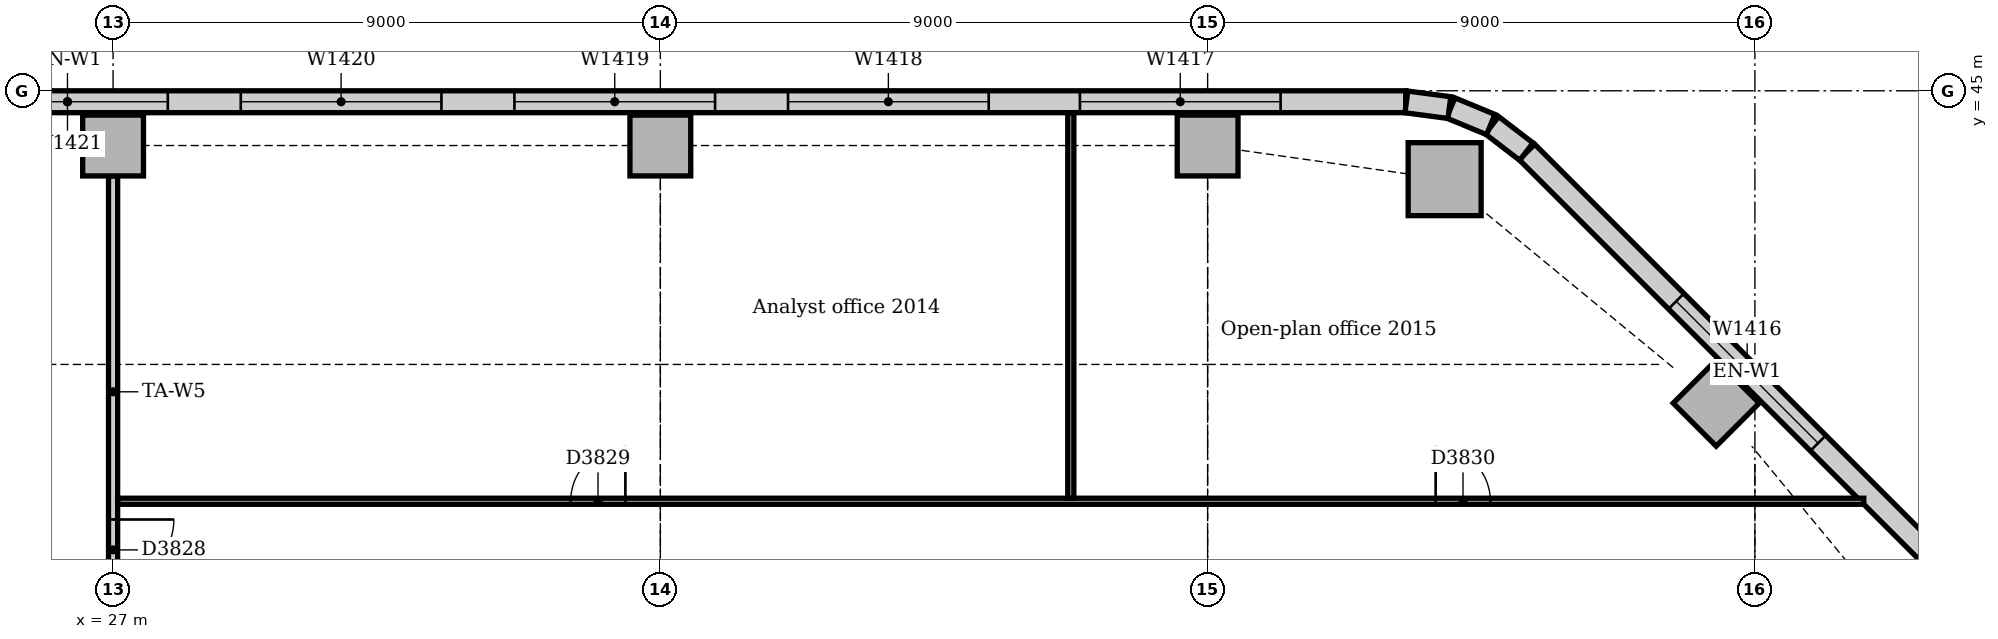
"""IFC4 building model, lengths in metres.
Left out: names, types, materials, properties, quantities, classifications, styles, units other than length and angle.
Written with IfcOpenShell. Run it as: python <this file> out.ifc"""

import sys

from ifc_helpers import new_model, si_unit, direction, frame, frame_2d, origin, origin_2d, place, context, subcontext, project, spatial, rectangle, extrude, element, fill, save


model = new_model("IFC4")
c1 = context("Model", 3, precision=1e-05, world=origin(), true_north=direction((0.0, 1.0)))
c2 = subcontext(c1, "Body", "Model", "MODEL_VIEW")
j1 = project(units=[si_unit("LENGTHUNIT", "METRE"), si_unit("PLANEANGLEUNIT", "RADIAN")], contexts=[c1])
p1 = place(None, origin())
s1 = spatial("IfcSite", under=j1, at=p1, CompositionType="ELEMENT")
p2 = place(p1, origin())
s2 = spatial("IfcBuilding", under=s1, at=p2, CompositionType="ELEMENT")
p3 = place(p2, frame((0.0, 0.0, 87.0)))
s3 = spatial("IfcBuildingStorey", under=s2, at=p3, CompositionType="ELEMENT", Elevation=87.0)
p4 = place(p3, frame((48.898, 43.547, 0.0), z_axis=(0.0, 0.0, 1.0), x_axis=(1.0, 0.0, 0.0)))
e1 = element("IfcColumn", 1, at=p4, inside=s3, PredefinedType="COLUMN", context=c2, shape_type="SweptSolid", body=[
    extrude(rectangle(XDim=1.2, YDim=1.2, at=origin_2d()), origin(), (0.0, 0.0, 1.0), 3.85),
])
for number, where, z_axis, x_axis in (
    (2, (53.364, 39.864, 0.0), (0.0, 0.0, 1.0), (0.707, 0.707, 0.0)),
    (3, (27.0, 44.1, 0.0), (0.0, 0.0, 1.0), (1.0, 0.0, 0.0)),
    (4, (36.0, 44.1, 0.0), (0.0, 0.0, 1.0), (1.0, 0.0, 0.0)),
    (5, (45.0, 44.1, 0.0), (0.0, 0.0, 1.0), (1.0, 0.0, 0.0)),
):
    element("IfcColumn", number, at=place(p3, frame(where, z_axis=z_axis, x_axis=x_axis)), inside=s3, PredefinedType="COLUMN", context=c2, shape_type="SweptSolid", body=[
        extrude(rectangle(XDim=1.0, YDim=1.0, at=origin_2d()), origin(), (0.0, 0.0, 1.0), 3.85),
    ])
p5 = place(p3, frame((57.494, 36.751, 0.0), z_axis=(0.0, 0.0, 1.0), x_axis=(-0.707106781187, 0.707106781187, 0.0)))
e6 = element("IfcWall", 6, at=p5, inside=s3, PredefinedType="STANDARD", context=c2, shape_type="SweptSolid", body=[
    extrude(rectangle(XDim=10.243, YDim=0.36, at=frame_2d((5.121, 0.0))), origin(), (0.0, 0.0, 1.0), 3.85),
])
p6 = place(p5, frame((3.471, 0.0, 0.9)))
e7 = element("IfcOpeningElement", 7, at=p6, cuts=e6, PredefinedType="OPENING", context=c2, shape_type="SweptSolid", body=[
    extrude(rectangle(XDim=3.3, YDim=1.6, at=frame_2d((1.65, 0.8))), frame((0.0, 0.19, 0.0), z_axis=(0.0, -1.0, 0.0), x_axis=(1.0, 0.0, 0.0)), (0.0, 0.0, 1.0), 0.38),
])
p7 = place(p3, frame((48.257, 44.82, 0.0), z_axis=(0.0, 0.0, 1.0), x_axis=(-1.0, 0.0, 0.0)))
e8 = element("IfcWall", 8, at=p7, inside=s3, PredefinedType="STANDARD", context=c2, shape_type="SweptSolid", body=[
    extrude(rectangle(XDim=44.015, YDim=0.36, at=frame_2d((22.007, 0.0))), origin(), (0.0, 0.0, 1.0), 3.85),
])
p8 = place(p7, frame((2.057, 0.0, 0.9)))
e9 = element("IfcOpeningElement", 9, at=p8, cuts=e8, PredefinedType="OPENING", context=c2, shape_type="SweptSolid", body=[
    extrude(rectangle(XDim=3.3, YDim=1.6, at=frame_2d((1.65, 0.8))), frame((0.0, 0.19, 0.0), z_axis=(0.0, -1.0, 0.0), x_axis=(1.0, 0.0, 0.0)), (0.0, 0.0, 1.0), 0.38),
])
p9 = place(p7, frame((6.857, 0.0, 0.9)))
e10 = element("IfcOpeningElement", 10, at=p9, cuts=e8, PredefinedType="OPENING", context=c2, shape_type="SweptSolid", body=[
    extrude(rectangle(XDim=3.3, YDim=1.6, at=frame_2d((1.65, 0.8))), frame((0.0, 0.19, 0.0), z_axis=(0.0, -1.0, 0.0), x_axis=(1.0, 0.0, 0.0)), (0.0, 0.0, 1.0), 0.38),
])
p10 = place(p7, frame((11.357, 0.0, 0.9)))
e11 = element("IfcOpeningElement", 11, at=p10, cuts=e8, PredefinedType="OPENING", context=c2, shape_type="SweptSolid", body=[
    extrude(rectangle(XDim=3.3, YDim=1.6, at=frame_2d((1.65, 0.8))), frame((0.0, 0.19, 0.0), z_axis=(0.0, -1.0, 0.0), x_axis=(1.0, 0.0, 0.0)), (0.0, 0.0, 1.0), 0.38),
])
p11 = place(p7, frame((15.857, 0.0, 0.9)))
e12 = element("IfcOpeningElement", 12, at=p11, cuts=e8, PredefinedType="OPENING", context=c2, shape_type="SweptSolid", body=[
    extrude(rectangle(XDim=3.3, YDim=1.6, at=frame_2d((1.65, 0.8))), frame((0.0, 0.19, 0.0), z_axis=(0.0, -1.0, 0.0), x_axis=(1.0, 0.0, 0.0)), (0.0, 0.0, 1.0), 0.38),
])
p12 = place(p7, frame((20.357, 0.0, 0.9)))
e13 = element("IfcOpeningElement", 13, at=p12, cuts=e8, PredefinedType="OPENING", context=c2, shape_type="SweptSolid", body=[
    extrude(rectangle(XDim=3.3, YDim=1.6, at=frame_2d((1.65, 0.8))), frame((0.0, 0.19, 0.0), z_axis=(0.0, -1.0, 0.0), x_axis=(1.0, 0.0, 0.0)), (0.0, 0.0, 1.0), 0.38),
])
p13 = place(p7, frame((25.957, 0.0, 0.9)))
e14 = element("IfcOpeningElement", 14, at=p13, cuts=e8, PredefinedType="OPENING", context=c2, shape_type="SweptSolid", body=[
    extrude(rectangle(XDim=1.8, YDim=1.6, at=frame_2d((0.9, 0.8))), frame((0.0, 0.19, 0.0), z_axis=(0.0, -1.0, 0.0), x_axis=(1.0, 0.0, 0.0)), (0.0, 0.0, 1.0), 0.38),
])
p14 = place(p7, frame((29.357, 0.0, 0.9)))
e15 = element("IfcOpeningElement", 15, at=p14, cuts=e8, PredefinedType="OPENING", context=c2, shape_type="SweptSolid", body=[
    extrude(rectangle(XDim=3.3, YDim=1.6, at=frame_2d((1.65, 0.8))), frame((0.0, 0.19, 0.0), z_axis=(0.0, -1.0, 0.0), x_axis=(1.0, 0.0, 0.0)), (0.0, 0.0, 1.0), 0.38),
])
p15 = place(p7, frame((33.857, 0.0, 0.9)))
e16 = element("IfcOpeningElement", 16, at=p15, cuts=e8, PredefinedType="OPENING", context=c2, shape_type="SweptSolid", body=[
    extrude(rectangle(XDim=3.3, YDim=1.6, at=frame_2d((1.65, 0.8))), frame((0.0, 0.19, 0.0), z_axis=(0.0, -1.0, 0.0), x_axis=(1.0, 0.0, 0.0)), (0.0, 0.0, 1.0), 0.38),
])
p16 = place(p7, frame((38.357, 0.0, 0.9)))
e17 = element("IfcOpeningElement", 17, at=p16, cuts=e8, PredefinedType="OPENING", context=c2, shape_type="SweptSolid", body=[
    extrude(rectangle(XDim=3.3, YDim=1.6, at=frame_2d((1.65, 0.8))), frame((0.0, 0.19, 0.0), z_axis=(0.0, -1.0, 0.0), x_axis=(1.0, 0.0, 0.0)), (0.0, 0.0, 1.0), 0.38),
])
p17 = place(p3, frame((50.241, 44.0, 0.0), z_axis=(0.0, 0.0, 1.0), x_axis=(-0.793321924995, 0.608802368033, 0.0)))
e18 = element("IfcWall", 18, at=p17, inside=s3, PredefinedType="STANDARD", context=c2, shape_type="SweptSolid", body=[
    extrude(rectangle(XDim=0.713, YDim=0.36, at=frame_2d((0.357, 0.0))), origin(), (0.0, 0.0, 1.0), 3.85),
])
for number, where, z_axis, x_axis in (
    (19, (49.656, 44.445, 0.0), (0.0, 0.0, 1.0), (-0.924, 0.383, 0.0)),
    (20, (48.976, 44.724, 0.0), (0.0, 0.0, 1.0), (-0.991, 0.131, 0.0)),
):
    element("IfcWall", number, at=place(p3, frame(where, z_axis=z_axis, x_axis=x_axis)), inside=s3, PredefinedType="STANDARD", context=c2, shape_type="SweptSolid", body=[
        extrude(rectangle(XDim=0.713, YDim=0.36, at=frame_2d((0.356, 0.0))), origin(), (0.0, 0.0, 1.0), 3.85),
    ])
p18 = place(p3, frame((27.0, 36.5, 0.0), z_axis=(0.0, 0.0, 1.0), x_axis=(0.0, 1.0, 0.0)))
e21 = element("IfcWall", 21, at=p18, inside=s3, PredefinedType="PARTITIONING", context=c2, shape_type="SweptSolid", body=[
    extrude(rectangle(XDim=7.1, YDim=0.15, at=frame_2d((3.55, 0.0))), origin(), (0.0, 0.0, 1.0), 3.158),
])
p19 = place(p18, frame((0.45, 0.0, 0.0)))
e22 = element("IfcOpeningElement", 22, at=p19, cuts=e21, PredefinedType="OPENING", context=c2, shape_type="SweptSolid", body=[
    extrude(rectangle(XDim=1.0, YDim=2.1, at=frame_2d((0.5, 1.05))), frame((0.0, 0.085, 0.0), z_axis=(0.0, -1.0, 0.0), x_axis=(1.0, 0.0, 0.0)), (0.0, 0.0, 1.0), 0.17),
])
p20 = place(p3, frame((27.075, 38.25, 0.0), z_axis=(0.0, 0.0, 1.0), x_axis=(1.0, 0.0, 0.0)))
e23 = element("IfcWall", 23, at=p20, inside=s3, PredefinedType="PARTITIONING", context=c2, shape_type="SweptSolid", body=[
    extrude(rectangle(XDim=28.716, YDim=0.1, at=frame_2d((14.358, 0.0))), origin(), (0.0, 0.0, 1.0), 3.85),
])
p21 = place(p20, frame((7.45, 0.0, 0.0)))
e24 = element("IfcOpeningElement", 24, at=p21, cuts=e23, PredefinedType="OPENING", context=c2, shape_type="SweptSolid", body=[
    extrude(rectangle(XDim=0.9, YDim=2.1, at=frame_2d((0.45, 1.05))), frame((0.0, 0.06, 0.0), z_axis=(0.0, -1.0, 0.0), x_axis=(1.0, 0.0, 0.0)), (0.0, 0.0, 1.0), 0.12),
])
p22 = place(p20, frame((21.675, 0.0, 0.0)))
e25 = element("IfcOpeningElement", 25, at=p22, cuts=e23, PredefinedType="OPENING", context=c2, shape_type="SweptSolid", body=[
    extrude(rectangle(XDim=0.9, YDim=2.1, at=frame_2d((0.45, 1.05))), frame((0.0, 0.06, 0.0), z_axis=(0.0, -1.0, 0.0), x_axis=(1.0, 0.0, 0.0)), (0.0, 0.0, 1.0), 0.12),
])
p23 = place(p3, frame((42.75, 38.3, 0.0), z_axis=(0.0, 0.0, 1.0), x_axis=(0.0, 1.0, 0.0)))
e26 = element("IfcWall", 26, at=p23, inside=s3, PredefinedType="PARTITIONING", context=c2, shape_type="SweptSolid", body=[
    extrude(rectangle(XDim=6.34, YDim=0.1, at=frame_2d((3.17, 0.0))), origin(), (0.0, 0.0, 1.0), 3.85),
])
p24 = place(p6, origin())
e27 = element("IfcWindow", 27, at=p24, inside=s3, PartitioningType="SINGLE_PANEL", PredefinedType="WINDOW", context=c2, shape_type="SweptSolid", body=[
    extrude(rectangle(XDim=3.3, YDim=1.6, at=frame_2d((1.65, 0.8))), frame((0.0, 0.13, 0.0), z_axis=(0.0, -1.0, 0.0), x_axis=(1.0, 0.0, 0.0)), (0.0, 0.0, 1.0), 0.06),
])
fill(e7, e27)
p25 = place(p8, origin())
e28 = element("IfcWindow", 28, at=p25, inside=s3, PartitioningType="SINGLE_PANEL", PredefinedType="WINDOW", context=c2, shape_type="SweptSolid", body=[
    extrude(rectangle(XDim=3.3, YDim=1.6, at=frame_2d((1.65, 0.8))), frame((0.0, 0.13, 0.0), z_axis=(0.0, -1.0, 0.0), x_axis=(1.0, 0.0, 0.0)), (0.0, 0.0, 1.0), 0.06),
])
fill(e9, e28)
p26 = place(p9, origin())
e29 = element("IfcWindow", 29, at=p26, inside=s3, PartitioningType="SINGLE_PANEL", PredefinedType="WINDOW", context=c2, shape_type="SweptSolid", body=[
    extrude(rectangle(XDim=3.3, YDim=1.6, at=frame_2d((1.65, 0.8))), frame((0.0, 0.13, 0.0), z_axis=(0.0, -1.0, 0.0), x_axis=(1.0, 0.0, 0.0)), (0.0, 0.0, 1.0), 0.06),
])
fill(e10, e29)
p27 = place(p10, origin())
e30 = element("IfcWindow", 30, at=p27, inside=s3, PartitioningType="SINGLE_PANEL", PredefinedType="WINDOW", context=c2, shape_type="SweptSolid", body=[
    extrude(rectangle(XDim=3.3, YDim=1.6, at=frame_2d((1.65, 0.8))), frame((0.0, 0.13, 0.0), z_axis=(0.0, -1.0, 0.0), x_axis=(1.0, 0.0, 0.0)), (0.0, 0.0, 1.0), 0.06),
])
fill(e11, e30)
p28 = place(p11, origin())
e31 = element("IfcWindow", 31, at=p28, inside=s3, PartitioningType="SINGLE_PANEL", PredefinedType="WINDOW", context=c2, shape_type="SweptSolid", body=[
    extrude(rectangle(XDim=3.3, YDim=1.6, at=frame_2d((1.65, 0.8))), frame((0.0, 0.13, 0.0), z_axis=(0.0, -1.0, 0.0), x_axis=(1.0, 0.0, 0.0)), (0.0, 0.0, 1.0), 0.06),
])
fill(e12, e31)
p29 = place(p12, origin())
e32 = element("IfcWindow", 32, at=p29, inside=s3, PartitioningType="SINGLE_PANEL", PredefinedType="WINDOW", context=c2, shape_type="SweptSolid", body=[
    extrude(rectangle(XDim=3.3, YDim=1.6, at=frame_2d((1.65, 0.8))), frame((0.0, 0.13, 0.0), z_axis=(0.0, -1.0, 0.0), x_axis=(1.0, 0.0, 0.0)), (0.0, 0.0, 1.0), 0.06),
])
fill(e13, e32)
p30 = place(p19, frame((1.0, 0.0, 0.0), z_axis=(0.0, 0.0, 1.0), x_axis=(-1.0, 0.0, 0.0)))
e33 = element("IfcDoor", 33, at=p30, inside=s3, OperationType="SINGLE_SWING_LEFT", PredefinedType="DOOR", context=c2, shape_type="SweptSolid", body=[
    extrude(rectangle(XDim=1.0, YDim=2.1, at=frame_2d((0.5, 1.05))), frame((0.0, 0.025, 0.0), z_axis=(0.0, -1.0, 0.0), x_axis=(1.0, 0.0, 0.0)), (0.0, 0.0, 1.0), 0.05),
])
fill(e22, e33)
p31 = place(p21, origin())
e34 = element("IfcDoor", 34, at=p31, inside=s3, OperationType="SINGLE_SWING_RIGHT", PredefinedType="DOOR", context=c2, shape_type="SweptSolid", body=[
    extrude(rectangle(XDim=0.9, YDim=2.1, at=frame_2d((0.45, 1.05))), frame((0.0, 0.025, 0.0), z_axis=(0.0, -1.0, 0.0), x_axis=(1.0, 0.0, 0.0)), (0.0, 0.0, 1.0), 0.05),
])
fill(e24, e34)
p32 = place(p22, origin())
e35 = element("IfcDoor", 35, at=p32, inside=s3, OperationType="SINGLE_SWING_LEFT", PredefinedType="DOOR", context=c2, shape_type="SweptSolid", body=[
    extrude(rectangle(XDim=0.9, YDim=2.1, at=frame_2d((0.45, 1.05))), frame((0.0, 0.025, 0.0), z_axis=(0.0, -1.0, 0.0), x_axis=(1.0, 0.0, 0.0)), (0.0, 0.0, 1.0), 0.05),
])
fill(e25, e35)
save(model, sys.argv[1])
